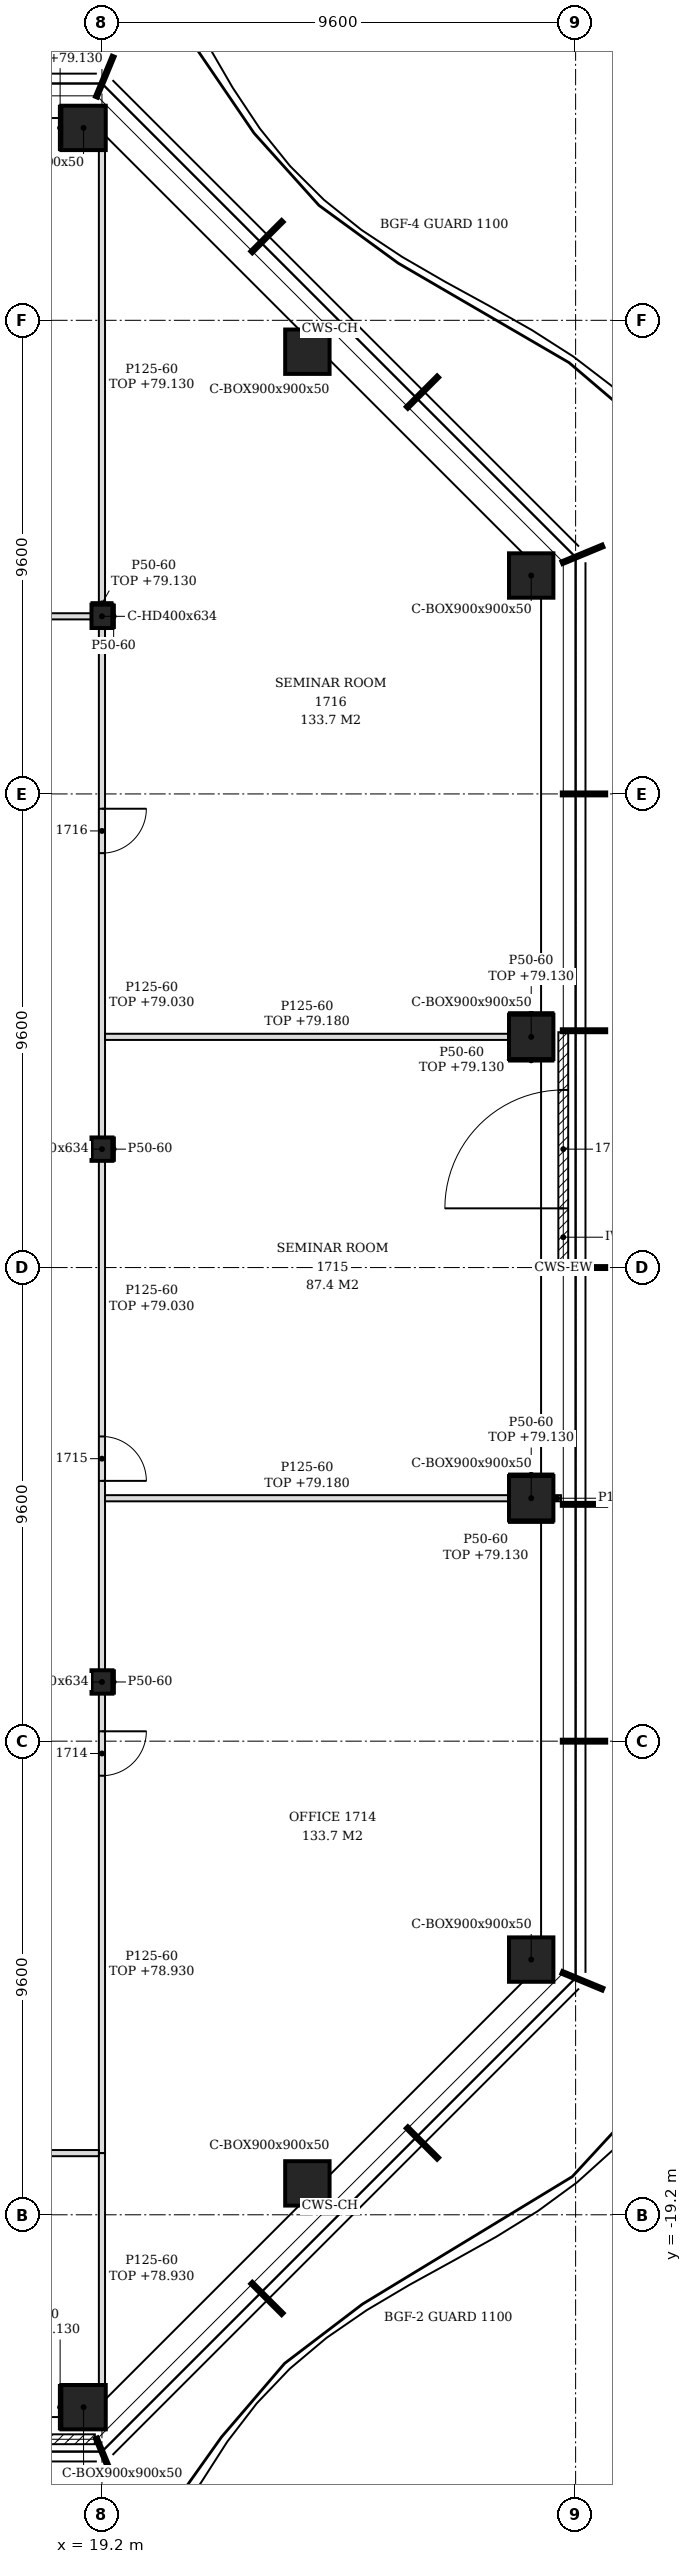
"""IFC4 building model, lengths in metres.
Left out: names, types, materials, properties, quantities, classifications, styles, units other than length and angle.
Written with IfcOpenShell. Run it as: python <this file> out.ifc"""

import sys

from ifc_helpers import new_model, si_unit, direction, frame, frame_2d, origin, origin_2d, place, context, subcontext, project, spatial, polyline, rectangle, hollow_rectangle, i_section, outline, extrude, element, fill, save


model = new_model("IFC4")
c1 = context("Model", 3, precision=1e-05, world=origin(), true_north=direction((0.0, 1.0)))
c2 = subcontext(c1, "Body", "Model", "MODEL_VIEW")
j1 = project(units=[si_unit("LENGTHUNIT", "METRE"), si_unit("PLANEANGLEUNIT", "RADIAN")], contexts=[c1])
p1 = place(None, origin())
s1 = spatial("IfcSite", under=j1, at=p1, CompositionType="ELEMENT")
p2 = place(p1, origin())
s2 = spatial("IfcBuilding", under=s1, at=p2, CompositionType="ELEMENT")
p3 = place(p2, frame((0.0, 0.0, 76.2)))
s3 = spatial("IfcBuildingStorey", under=s2, at=p3, CompositionType="ELEMENT", Elevation=76.2)
for number, where, z_axis, x_axis in (
    (1, (18.827, -23.1, -0.15), (0.0, 0.0, 1.0), (1.0, 0.0, 0.0)),
    (2, (23.364, -18.564, -0.15), (0.0, 0.0, 1.0), (1.0, 0.0, 0.0)),
    (3, (27.9, -14.027, -0.15), (0.0, 0.0, 1.0), (1.0, 0.0, 0.0)),
    (4, (27.9, -4.676, -0.15), (0.0, 0.0, 1.0), (1.0, 0.0, 0.0)),
    (5, (27.9, 4.676, -0.15), (0.0, 0.0, 1.0), (1.0, 0.0, 0.0)),
    (6, (27.9, 14.027, -0.15), (0.0, 0.0, 1.0), (1.0, 0.0, 0.0)),
    (7, (23.364, 18.564, -0.15), (0.0, 0.0, 1.0), (1.0, 0.0, 0.0)),
    (8, (18.827, 23.1, -0.15), (0.0, 0.0, 1.0), (1.0, 0.0, 0.0)),
):
    element("IfcColumn", number, at=place(p3, frame(where, z_axis=z_axis, x_axis=x_axis)), inside=s3, PredefinedType="COLUMN", context=c2, shape_type="SweptSolid", body=[
        extrude(hollow_rectangle(XDim=0.9, YDim=0.9, WallThickness=0.05, at=origin_2d()), origin(), (0.0, 0.0, 1.0), 3.6),
    ])
for number, where, z_axis, x_axis in (
    (9, (19.2, -8.4, -0.15), (0.0, 0.0, 1.0), (1.0, 0.0, 0.0)),
    (10, (19.2, 2.4, -0.15), (0.0, 0.0, 1.0), (1.0, 0.0, 0.0)),
    (11, (19.2, 13.2, -0.15), (0.0, 0.0, 1.0), (1.0, 0.0, 0.0)),
):
    element("IfcColumn", number, at=place(p3, frame(where, z_axis=z_axis, x_axis=x_axis)), inside=s3, PredefinedType="COLUMN", context=c2, shape_type="SweptSolid", body=[
        extrude(i_section(OverallWidth=0.424, OverallDepth=0.474, WebThickness=0.048, FlangeThickness=0.077, FilletRadius=0.015, at=origin_2d()), origin(), (0.0, 0.0, 1.0), 3.6),
    ])
p4 = place(p3, frame((14.43, -23.75, 0.0), z_axis=(0.0, 0.0, 1.0), x_axis=(1.0, 0.0, 0.0)))
e12 = element("IfcWall", 12, at=p4, inside=s3, PredefinedType="NOTDEFINED", context=c2, shape_type="SweptSolid", body=[
    extrude(rectangle(XDim=4.626, YDim=0.2, at=frame_2d((2.313, 0.0))), origin(), (0.0, 0.0, 1.0), 3.45),
])
p5 = place(p4, frame((1.118, 0.0, 0.0)))
e13 = element("IfcOpeningElement", 13, at=p5, cuts=e12, PredefinedType="OPENING", context=c2, shape_type="SweptSolid", body=[
    extrude(rectangle(XDim=2.4, YDim=2.4, at=frame_2d((1.2, 1.2))), frame((0.0, 0.11, 0.0), z_axis=(0.0, -1.0, 0.0), x_axis=(1.0, 0.0, 0.0)), (0.0, 0.0, 1.0), 0.22),
])
p6 = place(p3, frame((28.55, 0.03, 0.0), z_axis=(0.0, 0.0, 1.0), x_axis=(0.0, 1.0, 0.0)))
e14 = element("IfcWall", 14, at=p6, inside=s3, PredefinedType="NOTDEFINED", context=c2, shape_type="SweptSolid", body=[
    extrude(rectangle(XDim=4.74, YDim=0.2, at=frame_2d((2.37, 0.0))), origin(), (0.0, 0.0, 1.0), 3.45),
])
p7 = place(p6, frame((1.17, 0.0, 0.0)))
e15 = element("IfcOpeningElement", 15, at=p7, cuts=e14, PredefinedType="OPENING", context=c2, shape_type="SweptSolid", body=[
    extrude(rectangle(XDim=2.4, YDim=2.4, at=frame_2d((1.2, 1.2))), frame((0.0, 0.11, 0.0), z_axis=(0.0, -1.0, 0.0), x_axis=(1.0, 0.0, 0.0)), (0.0, 0.0, 1.0), 0.22),
])
p8 = place(p3, frame((19.2, -22.65, 0.0), z_axis=(0.0, 0.0, 1.0), x_axis=(0.0, 1.0, 0.0)))
e16 = element("IfcWall", 16, at=p8, inside=s3, PredefinedType="PARTITIONING", context=c2, shape_type="SweptSolid", body=[
    extrude(outline(polyline([(0.0, 0.0), (4.7, 0.0), (4.7, 2.73), (0.48, 2.73), (0.478, 2.63), (0.0, 2.63), (0.0, 0.0)])), frame((0.0, 0.062, 0.0), z_axis=(0.0, -1.0, 0.0), x_axis=(1.0, 0.0, 0.0)), (0.0, 0.0, 1.0), 0.125),
])
p9 = place(p3, frame((-20.75, -17.95, 0.0), z_axis=(0.0, 0.0, 1.0), x_axis=(1.0, 0.0, 0.0)))
e17 = element("IfcWall", 17, at=p9, inside=s3, PredefinedType="PARTITIONING", context=c2, shape_type="SweptSolid", body=[
    extrude(outline(polyline([(0.0, 0.0), (39.887, 0.0), (39.887, 2.73), (39.8, 2.73), (39.798, 3.45), (28.1, 3.45), (28.098, 2.73), (27.8, 2.73), (27.798, 3.45), (16.1, 3.45), (16.098, 2.73), (15.8, 2.73), (15.798, 3.45), (6.5, 3.45), (6.498, 2.93), (6.2, 2.93), (6.198, 3.45), (0.0, 3.45), (0.0, 0.0)])), frame((0.0, 0.062, 0.0), z_axis=(0.0, -1.0, 0.0), x_axis=(1.0, 0.0, 0.0)), (0.0, 0.0, 1.0), 0.125),
])
p10 = place(p9, frame((5.15, 0.0, 0.0)))
e18 = element("IfcOpeningElement", 18, at=p10, cuts=e17, PredefinedType="OPENING", context=c2, shape_type="SweptSolid", body=[
    extrude(rectangle(XDim=0.9, YDim=2.1, at=frame_2d((0.45, 1.05))), frame((0.0, 0.073, 0.0), z_axis=(0.0, -1.0, 0.0), x_axis=(1.0, 0.0, 0.0)), (0.0, 0.0, 1.0), 0.145),
])
p11 = place(p9, frame((14.75, 0.0, 0.0)))
e19 = element("IfcOpeningElement", 19, at=p11, cuts=e17, PredefinedType="OPENING", context=c2, shape_type="SweptSolid", body=[
    extrude(rectangle(XDim=0.9, YDim=2.1, at=frame_2d((0.45, 1.05))), frame((0.0, 0.073, 0.0), z_axis=(0.0, -1.0, 0.0), x_axis=(1.0, 0.0, 0.0)), (0.0, 0.0, 1.0), 0.145),
])
p12 = place(p9, frame((24.35, 0.0, 0.0)))
e20 = element("IfcOpeningElement", 20, at=p12, cuts=e17, PredefinedType="OPENING", context=c2, shape_type="SweptSolid", body=[
    extrude(rectangle(XDim=0.9, YDim=2.1, at=frame_2d((0.45, 1.05))), frame((0.0, 0.073, 0.0), z_axis=(0.0, -1.0, 0.0), x_axis=(1.0, 0.0, 0.0)), (0.0, 0.0, 1.0), 0.145),
])
p13 = place(p9, frame((29.75, 0.0, 0.0)))
e21 = element("IfcOpeningElement", 21, at=p13, cuts=e17, PredefinedType="OPENING", context=c2, shape_type="SweptSolid", body=[
    extrude(rectangle(XDim=0.9, YDim=2.1, at=frame_2d((0.45, 1.05))), frame((0.0, 0.073, 0.0), z_axis=(0.0, -1.0, 0.0), x_axis=(1.0, 0.0, 0.0)), (0.0, 0.0, 1.0), 0.145),
])
p14 = place(p9, frame((35.45, 0.0, 0.0)))
e22 = element("IfcOpeningElement", 22, at=p14, cuts=e17, PredefinedType="OPENING", context=c2, shape_type="SweptSolid", body=[
    extrude(rectangle(XDim=0.9, YDim=2.1, at=frame_2d((0.45, 1.05))), frame((0.0, 0.073, 0.0), z_axis=(0.0, -1.0, 0.0), x_axis=(1.0, 0.0, 0.0)), (0.0, 0.0, 1.0), 0.145),
])
p15 = place(p3, frame((19.2, -17.95, 0.0), z_axis=(0.0, 0.0, 1.0), x_axis=(0.0, 1.0, 0.0)))
e23 = element("IfcWall", 23, at=p15, inside=s3, PredefinedType="PARTITIONING", context=c2, shape_type="SweptSolid", body=[
    extrude(rectangle(XDim=9.313, YDim=0.125, at=frame_2d((4.656, 0.0))), origin(), (0.0, 0.0, 1.0), 2.73),
])
p16 = place(p15, frame((7.65, 0.0, 0.0)))
e24 = element("IfcOpeningElement", 24, at=p16, cuts=e23, PredefinedType="OPENING", context=c2, shape_type="SweptSolid", body=[
    extrude(rectangle(XDim=0.9, YDim=2.1, at=frame_2d((0.45, 1.05))), frame((0.0, 0.073, 0.0), z_axis=(0.0, -1.0, 0.0), x_axis=(1.0, 0.0, 0.0)), (0.0, 0.0, 1.0), 0.145),
])
p17 = place(p3, frame((19.2, -8.163, 0.0), z_axis=(0.0, 0.0, 1.0), x_axis=(0.0, 1.0, 0.0)))
e25 = element("IfcWall", 25, at=p17, inside=s3, PredefinedType="PARTITIONING", context=c2, shape_type="SweptSolid", body=[
    extrude(rectangle(XDim=10.326, YDim=0.125, at=frame_2d((5.163, 0.0))), origin(), (0.0, 0.0, 1.0), 2.83),
])
p18 = place(p17, frame((3.839, 0.0, 0.0)))
e26 = element("IfcOpeningElement", 26, at=p18, cuts=e25, PredefinedType="OPENING", context=c2, shape_type="SweptSolid", body=[
    extrude(rectangle(XDim=0.9, YDim=2.1, at=frame_2d((0.45, 1.05))), frame((0.0, 0.073, 0.0), z_axis=(0.0, -1.0, 0.0), x_axis=(1.0, 0.0, 0.0)), (0.0, 0.0, 1.0), 0.145),
])
p19 = place(p3, frame((19.262, -4.676, 0.0), z_axis=(0.0, 0.0, 1.0), x_axis=(1.0, 0.0, 0.0)))
e27 = element("IfcWall", 27, at=p19, inside=s3, PredefinedType="PARTITIONING", context=c2, shape_type="SweptSolid", body=[
    extrude(outline(polyline([(0.0, 0.0), (8.188, 0.0), (8.188, 2.98), (0.087, 2.98), (0.085, 2.83), (0.0, 2.83), (0.0, 0.0)])), frame((0.0, 0.062, 0.0), z_axis=(0.0, -1.0, 0.0), x_axis=(1.0, 0.0, 0.0)), (0.0, 0.0, 1.0), 0.125),
])
p20 = place(p3, frame((28.35, -4.676, 0.0), z_axis=(0.0, 0.0, 1.0), x_axis=(1.0, 0.0, 0.0)))
e28 = element("IfcWall", 28, at=p20, inside=s3, PredefinedType="PARTITIONING", context=c2, shape_type="SweptSolid", body=[
    extrude(rectangle(XDim=0.153, YDim=0.125, at=frame_2d((0.076, 0.0))), origin(), (0.0, 0.0, 1.0), 3.45),
])
p21 = place(p3, frame((19.2, 2.637, 0.0), z_axis=(0.0, 0.0, 1.0), x_axis=(0.0, 1.0, 0.0)))
e29 = element("IfcWall", 29, at=p21, inside=s3, PredefinedType="PARTITIONING", context=c2, shape_type="SweptSolid", body=[
    extrude(rectangle(XDim=10.326, YDim=0.125, at=frame_2d((5.163, 0.0))), origin(), (0.0, 0.0, 1.0), 2.83),
])
p22 = place(p21, frame((5.763, 0.0, 0.0)))
e30 = element("IfcOpeningElement", 30, at=p22, cuts=e29, PredefinedType="OPENING", context=c2, shape_type="SweptSolid", body=[
    extrude(rectangle(XDim=0.9, YDim=2.1, at=frame_2d((0.45, 1.05))), frame((0.0, 0.073, 0.0), z_axis=(0.0, -1.0, 0.0), x_axis=(1.0, 0.0, 0.0)), (0.0, 0.0, 1.0), 0.145),
])
p23 = place(p3, frame((19.262, 4.676, 0.0), z_axis=(0.0, 0.0, 1.0), x_axis=(1.0, 0.0, 0.0)))
e31 = element("IfcWall", 31, at=p23, inside=s3, PredefinedType="PARTITIONING", context=c2, shape_type="SweptSolid", body=[
    extrude(outline(polyline([(0.0, 0.0), (8.188, 0.0), (8.188, 2.98), (0.087, 2.98), (0.085, 2.83), (0.0, 2.83), (0.0, 0.0)])), frame((0.0, 0.062, 0.0), z_axis=(0.0, -1.0, 0.0), x_axis=(1.0, 0.0, 0.0)), (0.0, 0.0, 1.0), 0.125),
])
p24 = place(p3, frame((7.412, 13.2, 0.0), z_axis=(0.0, 0.0, 1.0), x_axis=(1.0, 0.0, 0.0)))
e32 = element("IfcWall", 32, at=p24, inside=s3, PredefinedType="PARTITIONING", context=c2, shape_type="SweptSolid", body=[
    extrude(rectangle(XDim=11.576, YDim=0.125, at=frame_2d((5.788, 0.0))), origin(), (0.0, 0.0, 1.0), 2.83),
])
p25 = place(p24, frame((1.588, 0.0, 0.0)))
e33 = element("IfcOpeningElement", 33, at=p25, cuts=e32, PredefinedType="OPENING", context=c2, shape_type="SweptSolid", body=[
    extrude(rectangle(XDim=0.9, YDim=2.1, at=frame_2d((0.45, 1.05))), frame((0.0, 0.073, 0.0), z_axis=(0.0, -1.0, 0.0), x_axis=(1.0, 0.0, 0.0)), (0.0, 0.0, 1.0), 0.145),
])
p26 = place(p3, frame((19.2, 13.437, 0.0), z_axis=(0.0, 0.0, 1.0), x_axis=(0.0, 1.0, 0.0)))
e34 = element("IfcWall", 34, at=p26, inside=s3, PredefinedType="PARTITIONING", context=c2, shape_type="SweptSolid", body=[
    extrude(outline(polyline([(0.0, 0.0), (9.213, 0.0), (9.213, 2.63), (8.733, 2.63), (8.731, 2.93), (0.0, 2.93), (0.0, 0.0)])), frame((0.0, 0.062, 0.0), z_axis=(0.0, -1.0, 0.0), x_axis=(1.0, 0.0, 0.0)), (0.0, 0.0, 1.0), 0.125),
])
p27 = place(p3, frame((18.352, -23.55, 0.0), z_axis=(0.0, 0.0, 1.0), x_axis=(0.0, 1.0, 0.0)))
e35 = element("IfcWall", 35, at=p27, inside=s3, PredefinedType="PARTITIONING", context=c2, shape_type="SweptSolid", body=[
    extrude(rectangle(XDim=0.9, YDim=0.05, at=frame_2d((0.45, 0.0))), origin(), (0.0, 0.0, 1.0), 2.93),
])
for number, where, z_axis, x_axis in (
    (36, (19.437, -8.637, 0.0), (0.0, 0.0, 1.0), (0.0, 1.0, 0.0)),
    (37, (19.437, 2.163, 0.0), (0.0, 0.0, 1.0), (0.0, 1.0, 0.0)),
):
    element("IfcWall", number, at=place(p3, frame(where, z_axis=z_axis, x_axis=x_axis)), inside=s3, PredefinedType="PARTITIONING", context=c2, shape_type="SweptSolid", body=[
        extrude(rectangle(XDim=0.474, YDim=0.05, at=frame_2d((0.237, 0.0))), origin(), (0.0, 0.0, 1.0), 3.45),
    ])
p28 = place(p3, frame((19.437, 12.963, 0.0), z_axis=(0.0, 0.0, 1.0), x_axis=(0.0, 1.0, 0.0)))
e38 = element("IfcWall", 38, at=p28, inside=s3, PredefinedType="PARTITIONING", context=c2, shape_type="SweptSolid", body=[
    extrude(rectangle(XDim=0.474, YDim=0.05, at=frame_2d((0.237, 0.0))), origin(), (0.0, 0.0, 1.0), 3.45),
])
for number, where, z_axis, x_axis in (
    (39, (27.45, -4.201, 0.0), (0.0, 0.0, 1.0), (1.0, 0.0, 0.0)),
    (40, (27.45, -5.151, 0.0), (0.0, 0.0, 1.0), (1.0, 0.0, 0.0)),
    (41, (27.45, 5.151, 0.0), (0.0, 0.0, 1.0), (1.0, 0.0, 0.0)),
    (42, (27.45, 4.201, 0.0), (0.0, 0.0, 1.0), (1.0, 0.0, 0.0)),
):
    element("IfcWall", number, at=place(p3, frame(where, z_axis=z_axis, x_axis=x_axis)), inside=s3, PredefinedType="PARTITIONING", context=c2, shape_type="SweptSolid", body=[
        extrude(rectangle(XDim=0.9, YDim=0.05, at=frame_2d((0.45, 0.0))), origin(), (0.0, 0.0, 1.0), 2.93),
    ])
p29 = place(p3, frame((18.988, 13.462, 0.0), z_axis=(0.0, 0.0, 1.0), x_axis=(1.0, 0.0, 0.0)))
e43 = element("IfcWall", 43, at=p29, inside=s3, PredefinedType="PARTITIONING", context=c2, shape_type="SweptSolid", body=[
    extrude(rectangle(XDim=0.424, YDim=0.05, at=frame_2d((0.212, 0.0))), origin(), (0.0, 0.0, 1.0), 2.93),
])
p30 = place(p3, frame((18.352, 22.65, 0.0), z_axis=(0.0, 0.0, 1.0), x_axis=(0.0, 1.0, 0.0)))
e44 = element("IfcWall", 44, at=p30, inside=s3, PredefinedType="PARTITIONING", context=c2, shape_type="SweptSolid", body=[
    extrude(rectangle(XDim=0.9, YDim=0.05, at=frame_2d((0.45, 0.0))), origin(), (0.0, 0.0, 1.0), 2.93),
])
p31 = place(p7, origin())
e45 = element("IfcDoor", 45, at=p31, inside=s3, OperationType="SINGLE_SWING_LEFT", PredefinedType="DOOR", context=c2, shape_type="SweptSolid", body=[
    extrude(rectangle(XDim=2.4, YDim=2.4, at=frame_2d((1.2, 1.2))), frame((0.0, 0.025, 0.0), z_axis=(0.0, -1.0, 0.0), x_axis=(1.0, 0.0, 0.0)), (0.0, 0.0, 1.0), 0.05),
])
fill(e15, e45)
p32 = place(p16, frame((0.9, 0.0, 0.0), z_axis=(0.0, 0.0, 1.0), x_axis=(-1.0, 0.0, 0.0)))
e46 = element("IfcDoor", 46, at=p32, inside=s3, OperationType="SINGLE_SWING_LEFT", PredefinedType="DOOR", context=c2, shape_type="SweptSolid", body=[
    extrude(rectangle(XDim=0.9, YDim=2.1, at=frame_2d((0.45, 1.05))), frame((0.0, 0.025, 0.0), z_axis=(0.0, -1.0, 0.0), x_axis=(1.0, 0.0, 0.0)), (0.0, 0.0, 1.0), 0.05),
])
fill(e24, e46)
p33 = place(p18, frame((0.9, 0.0, 0.0), z_axis=(0.0, 0.0, 1.0), x_axis=(-1.0, 0.0, 0.0)))
e47 = element("IfcDoor", 47, at=p33, inside=s3, OperationType="SINGLE_SWING_RIGHT", PredefinedType="DOOR", context=c2, shape_type="SweptSolid", body=[
    extrude(rectangle(XDim=0.9, YDim=2.1, at=frame_2d((0.45, 1.05))), frame((0.0, 0.025, 0.0), z_axis=(0.0, -1.0, 0.0), x_axis=(1.0, 0.0, 0.0)), (0.0, 0.0, 1.0), 0.05),
])
fill(e26, e47)
p34 = place(p22, frame((0.9, 0.0, 0.0), z_axis=(0.0, 0.0, 1.0), x_axis=(-1.0, 0.0, 0.0)))
e48 = element("IfcDoor", 48, at=p34, inside=s3, OperationType="SINGLE_SWING_LEFT", PredefinedType="DOOR", context=c2, shape_type="SweptSolid", body=[
    extrude(rectangle(XDim=0.9, YDim=2.1, at=frame_2d((0.45, 1.05))), frame((0.0, 0.025, 0.0), z_axis=(0.0, -1.0, 0.0), x_axis=(1.0, 0.0, 0.0)), (0.0, 0.0, 1.0), 0.05),
])
fill(e30, e48)
save(model, sys.argv[1])
